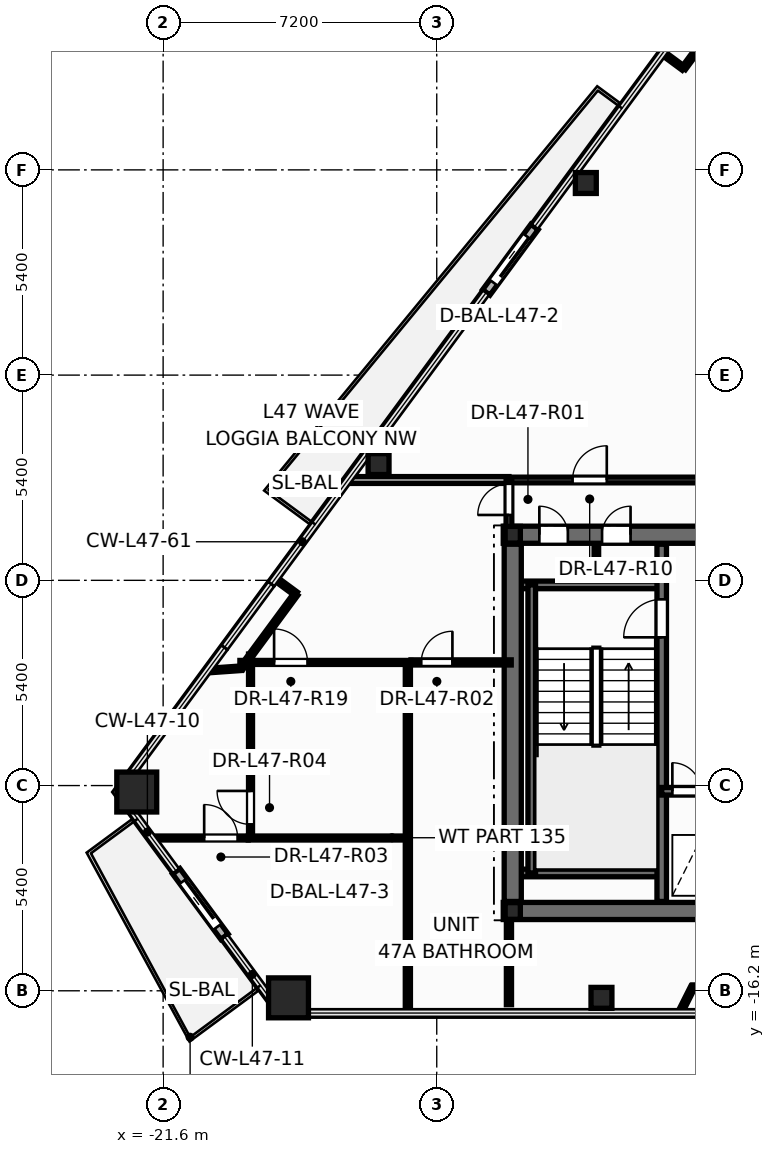
"""IFC4 building model, lengths in metres.
Left out: names, types, materials, properties, quantities, classifications, styles, units other than length and angle.
Written with IfcOpenShell. Run it as: python <this file> out.ifc"""

import sys

from ifc_helpers import new_model, si_unit, direction, frame, frame_2d, origin, origin_2d, place, context, subcontext, project, spatial, rectangle, hollow_rectangle, hollow_circle, i_section, extrude, element, fill, save


model = new_model("IFC4")
c1 = context("Model", 3, precision=1e-05, world=origin(), true_north=direction((0.0, 1.0)))
c2 = subcontext(c1, "Body", "Model", "MODEL_VIEW")
j1 = project(units=[si_unit("LENGTHUNIT", "METRE"), si_unit("PLANEANGLEUNIT", "RADIAN")], contexts=[c1])
p1 = place(None, origin())
s1 = spatial("IfcSite", under=j1, at=p1, CompositionType="ELEMENT")
p2 = place(p1, origin())
s2 = spatial("IfcBuilding", under=s1, at=p2, CompositionType="ELEMENT")
p3 = place(p2, frame((0.0, 0.0, 182.1)))
s3 = spatial("IfcBuildingStorey", under=s2, at=p3, CompositionType="ELEMENT", Elevation=182.1)
for number, where, z_axis, x_axis in (
    (1, (-22.294, -10.97, 0.0), (0.0, 0.0, 1.0), (1.0, 0.0, 0.0)),
    (2, (-18.301, -16.385, 0.0), (0.0, 0.0, 1.0), (1.0, 0.0, 0.0)),
):
    element("IfcColumn", number, at=place(p3, frame(where, z_axis=z_axis, x_axis=x_axis)), inside=s3, PredefinedType="COLUMN", context=c2, shape_type="SweptSolid", body=[
        extrude(hollow_rectangle(XDim=1.05, YDim=1.05, WallThickness=0.045, at=origin_2d()), origin(), (0.0, 0.0, 1.0), 3.6),
    ])
for number, where, z_axis, x_axis in (
    (3, (-10.065, -16.385, 0.0), (0.0, 0.0, 1.0), (1.0, 0.0, 0.0)),
    (4, (-10.477, 5.055, 0.0), (0.0, 0.0, 1.0), (1.0, 0.0, 0.0)),
    (5, (-15.931, -2.341, 0.0), (0.0, 0.0, 1.0), (1.0, 0.0, 0.0)),
):
    element("IfcColumn", number, at=place(p3, frame(where, z_axis=z_axis, x_axis=x_axis)), inside=s3, PredefinedType="COLUMN", context=c2, shape_type="SweptSolid", body=[
        extrude(hollow_circle(Radius=0.275, WallThickness=0.024, at=origin_2d()), origin(), (0.0, 0.0, 1.0), 3.6),
    ])
for number, where, z_axis, x_axis in (
    (6, (-12.4, -14.1, 0.0), (0.0, 0.0, 1.0), (1.0, 0.0, 0.0)),
    (7, (-12.4, -4.2, 0.0), (0.0, 0.0, 1.0), (1.0, 0.0, 0.0)),
):
    element("IfcColumn", number, at=place(p3, frame(where, z_axis=z_axis, x_axis=x_axis)), inside=s3, PredefinedType="COLUMN", context=c2, shape_type="SweptSolid", body=[
        extrude(i_section(OverallWidth=0.4, OverallDepth=0.44, WebThickness=0.028, FlangeThickness=0.04, at=origin_2d()), origin(), (0.0, 0.0, 1.0), 3.6),
    ])
p4 = place(p3, frame((-11.826, 3.899, -0.015), z_axis=(0.0, 0.0, 1.0), x_axis=(-0.593537527179, -0.804806314482, 0.0)))
e8 = element("IfcWall", 8, at=p4, inside=s3, PredefinedType="STANDARD", context=c2, shape_type="SweptSolid", body=[
    extrude(rectangle(XDim=2.14, YDim=0.24, at=frame_2d((1.07, 0.0))), origin(), (0.0, 0.0, 1.0), 2.807),
])
p5 = place(p4, frame((0.32, 0.0, 0.015)))
e9 = element("IfcOpeningElement", 9, at=p5, cuts=e8, PredefinedType="OPENING", context=c2, shape_type="SweptSolid", body=[
    extrude(rectangle(XDim=1.506, YDim=2.204, at=frame_2d((0.75, 1.102))), frame((0.0, 0.13, 0.0), z_axis=(0.0, -1.0, 0.0), x_axis=(1.0, 0.0, 0.0)), (0.0, 0.0, 1.0), 0.26),
])
p6 = place(p3, frame((-21.255, -13.053, -0.015), z_axis=(0.0, 0.0, 1.0), x_axis=(0.593463631131, -0.804860806926, 0.0)))
e10 = element("IfcWall", 10, at=p6, inside=s3, PredefinedType="STANDARD", context=c2, shape_type="SweptSolid", body=[
    extrude(rectangle(XDim=2.14, YDim=0.24, at=frame_2d((1.07, 0.0))), origin(), (0.0, 0.0, 1.0), 2.807),
])
p7 = place(p6, frame((0.32, 0.0, 0.015)))
e11 = element("IfcOpeningElement", 11, at=p7, cuts=e10, PredefinedType="OPENING", context=c2, shape_type="SweptSolid", body=[
    extrude(rectangle(XDim=1.506, YDim=2.204, at=frame_2d((0.75, 1.102))), frame((0.0, 0.13, 0.0), z_axis=(0.0, -1.0, 0.0), x_axis=(1.0, 0.0, 0.0)), (0.0, 0.0, 1.0), 0.26),
])
p8 = place(p3, frame((-10.2, -5.52, 0.0), z_axis=(0.0, 0.0, 1.0), x_axis=(0.0, 1.0, 0.0)))
e12 = element("IfcWall", 12, at=p8, inside=s3, PredefinedType="PARTITIONING", context=c2, shape_type="SweptSolid", body=[
    extrude(rectangle(XDim=1.12, YDim=0.12, at=frame_2d((0.56, 0.0))), origin(), (0.0, 0.0, 1.0), 3.35),
])
p9 = place(p3, frame((-12.65, -14.1, 0.0), z_axis=(0.0, 0.0, 1.0), x_axis=(1.0, 0.0, 0.0)))
e13 = element("IfcWall", 13, at=p9, inside=s3, PredefinedType="SHEAR", context=c2, shape_type="SweptSolid", body=[
    extrude(rectangle(XDim=25.3, YDim=0.45, at=frame_2d((12.65, 0.0))), origin(), (0.0, 0.0, 1.0), 3.6),
])
p10 = place(p3, frame((-12.65, -4.2, 0.0), z_axis=(0.0, 0.0, 1.0), x_axis=(1.0, 0.0, 0.0)))
e14 = element("IfcWall", 14, at=p10, inside=s3, PredefinedType="SHEAR", context=c2, shape_type="SweptSolid", body=[
    extrude(rectangle(XDim=25.3, YDim=0.45, at=frame_2d((12.65, 0.0))), origin(), (0.0, 0.0, 1.0), 3.6),
])
p11 = place(p10, frame((0.95, 0.0, 0.0)))
e15 = element("IfcOpeningElement", 15, at=p11, cuts=e14, PredefinedType="OPENING", context=c2, shape_type="SweptSolid", body=[
    extrude(rectangle(XDim=0.756, YDim=2.054, at=frame_2d((0.375, 1.027))), frame((0.0, 0.235, 0.0), z_axis=(0.0, -1.0, 0.0), x_axis=(1.0, 0.0, 0.0)), (0.0, 0.0, 1.0), 0.47),
])
p12 = place(p10, frame((2.6, 0.0, 0.0)))
e16 = element("IfcOpeningElement", 16, at=p12, cuts=e14, PredefinedType="OPENING", context=c2, shape_type="SweptSolid", body=[
    extrude(rectangle(XDim=0.756, YDim=2.054, at=frame_2d((0.375, 1.027))), frame((0.0, 0.235, 0.0), z_axis=(0.0, -1.0, 0.0), x_axis=(1.0, 0.0, 0.0)), (0.0, 0.0, 1.0), 0.47),
])
p13 = place(p10, frame((21.85, 0.0, 0.0)))
e17 = element("IfcOpeningElement", 17, at=p13, cuts=e14, PredefinedType="OPENING", context=c2, shape_type="SweptSolid", body=[
    extrude(rectangle(XDim=0.756, YDim=2.054, at=frame_2d((0.375, 1.027))), frame((0.0, 0.235, 0.0), z_axis=(0.0, -1.0, 0.0), x_axis=(1.0, 0.0, 0.0)), (0.0, 0.0, 1.0), 0.47),
])
p14 = place(p10, frame((23.5, 0.0, 0.0)))
e18 = element("IfcOpeningElement", 18, at=p14, cuts=e14, PredefinedType="OPENING", context=c2, shape_type="SweptSolid", body=[
    extrude(rectangle(XDim=0.756, YDim=2.054, at=frame_2d((0.375, 1.027))), frame((0.0, 0.235, 0.0), z_axis=(0.0, -1.0, 0.0), x_axis=(1.0, 0.0, 0.0)), (0.0, 0.0, 1.0), 0.47),
])
p15 = place(p10, frame((5.85, 0.0, 0.0)))
e19 = element("IfcOpeningElement", 19, at=p15, cuts=e14, PredefinedType="OPENING", context=c2, shape_type="SweptSolid", body=[
    extrude(rectangle(XDim=1.006, YDim=2.104, at=frame_2d((0.5, 1.052))), frame((0.0, 0.235, 0.0), z_axis=(0.0, -1.0, 0.0), x_axis=(1.0, 0.0, 0.0)), (0.0, 0.0, 1.0), 0.47),
])
p16 = place(p10, frame((10.35, 0.0, 0.0)))
e20 = element("IfcOpeningElement", 20, at=p16, cuts=e14, PredefinedType="OPENING", context=c2, shape_type="SweptSolid", body=[
    extrude(rectangle(XDim=1.406, YDim=2.154, at=frame_2d((0.7, 1.077))), frame((0.0, 0.235, 0.0), z_axis=(0.0, -1.0, 0.0), x_axis=(1.0, 0.0, 0.0)), (0.0, 0.0, 1.0), 0.47),
])
p17 = place(p10, frame((18.45, 0.0, 0.0)))
e21 = element("IfcOpeningElement", 21, at=p17, cuts=e14, PredefinedType="OPENING", context=c2, shape_type="SweptSolid", body=[
    extrude(rectangle(XDim=1.006, YDim=2.104, at=frame_2d((0.5, 1.052))), frame((0.0, 0.235, 0.0), z_axis=(0.0, -1.0, 0.0), x_axis=(1.0, 0.0, 0.0)), (0.0, 0.0, 1.0), 0.47),
])
for number, where, z_axis, x_axis in (
    (22, (-12.35, -5.52, 0.0), (0.0, 0.0, 1.0), (1.0, 0.0, 0.0)),
    (23, (-12.35, -13.1, 0.0), (0.0, 0.0, 1.0), (1.0, 0.0, 0.0)),
):
    element("IfcWall", number, at=place(p3, frame(where, z_axis=z_axis, x_axis=x_axis)), inside=s3, PredefinedType="SOLIDWALL", context=c2, shape_type="SweptSolid", body=[
        extrude(rectangle(XDim=3.87, YDim=0.2, at=frame_2d((1.935, 0.0))), origin(), (0.0, 0.0, 1.0), 3.6),
    ])
p18 = place(p3, frame((-11.9, -13.1, 0.0), z_axis=(0.0, 0.0, 1.0), x_axis=(0.0, 1.0, 0.0)))
e24 = element("IfcWall", 24, at=p18, inside=s3, PredefinedType="SOLIDWALL", context=c2, shape_type="SweptSolid", body=[
    extrude(rectangle(XDim=7.58, YDim=0.2, at=frame_2d((3.79, 0.0))), origin(), (0.0, 0.0, 1.0), 3.6),
])
p19 = place(p3, frame((-8.48, -13.85, 0.0), z_axis=(0.0, 0.0, 1.0), x_axis=(0.0, 1.0, 0.0)))
e25 = element("IfcWall", 25, at=p19, inside=s3, PredefinedType="SHEAR", context=c2, shape_type="SweptSolid", body=[
    extrude(rectangle(XDim=9.4, YDim=0.25, at=frame_2d((4.7, 0.0))), origin(), (0.0, 0.0, 1.0), 3.6),
])
p20 = place(p19, frame((6.95, 0.0, 0.0)))
e26 = element("IfcOpeningElement", 26, at=p20, cuts=e25, PredefinedType="OPENING", context=c2, shape_type="SweptSolid", body=[
    extrude(rectangle(XDim=1.006, YDim=2.104, at=frame_2d((0.5, 1.052))), frame((0.0, 0.135, 0.0), z_axis=(0.0, -1.0, 0.0), x_axis=(1.0, 0.0, 0.0)), (0.0, 0.0, 1.0), 0.27),
])
p21 = place(p3, frame((-8.48, -10.95, 0.0), z_axis=(0.0, 0.0, 1.0), x_axis=(1.0, 0.0, 0.0)))
e27 = element("IfcWall", 27, at=p21, inside=s3, PredefinedType="SOLIDWALL", context=c2, shape_type="SweptSolid", body=[
    extrude(rectangle(XDim=3.36, YDim=0.2, at=frame_2d((1.68, 0.0))), origin(), (0.0, 0.0, 1.0), 3.6),
])
p22 = place(p21, frame((0.28, 0.0, 0.0)))
e28 = element("IfcOpeningElement", 28, at=p22, cuts=e27, PredefinedType="OPENING", context=c2, shape_type="SweptSolid", body=[
    extrude(rectangle(XDim=0.756, YDim=2.054, at=frame_2d((0.375, 1.027))), frame((0.0, 0.11, 0.0), z_axis=(0.0, -1.0, 0.0), x_axis=(1.0, 0.0, 0.0)), (0.0, 0.0, 1.0), 0.22),
])
p23 = place(p21, frame((1.85, 0.0, 0.0)))
e29 = element("IfcOpeningElement", 29, at=p23, cuts=e27, PredefinedType="OPENING", context=c2, shape_type="SweptSolid", body=[
    extrude(rectangle(XDim=1.106, YDim=2.104, at=frame_2d((0.55, 1.052))), frame((0.0, 0.11, 0.0), z_axis=(0.0, -1.0, 0.0), x_axis=(1.0, 0.0, 0.0)), (0.0, 0.0, 1.0), 0.22),
])
p24 = place(p3, frame((-12.4, -13.85, 0.0), z_axis=(0.0, 0.0, 1.0), x_axis=(0.0, 1.0, 0.0)))
e30 = element("IfcWall", 30, at=p24, inside=s3, PredefinedType="SHEAR", context=c2, shape_type="SweptSolid", body=[
    extrude(rectangle(XDim=9.4, YDim=0.45, at=frame_2d((4.7, 0.0))), origin(), (0.0, 0.0, 1.0), 3.6),
])
p25 = place(p3, frame((-12.5, -2.76, 0.0), z_axis=(0.0, 0.0, 1.0), x_axis=(1.0, 0.0, 0.0)))
e31 = element("IfcWall", 31, at=p25, inside=s3, PredefinedType="PARTITIONING", context=c2, shape_type="SweptSolid", body=[
    extrude(rectangle(XDim=6.76, YDim=0.15, at=frame_2d((3.38, 0.0))), origin(), (0.0, 0.0, 1.0), 2.325),
])
p26 = place(p25, frame((1.675, 0.0, 0.0)))
e32 = element("IfcOpeningElement", 32, at=p26, cuts=e31, PredefinedType="OPENING", context=c2, shape_type="SweptSolid", body=[
    extrude(rectangle(XDim=0.906, YDim=2.104, at=frame_2d((0.45, 1.052))), frame((0.0, 0.085, 0.0), z_axis=(0.0, -1.0, 0.0), x_axis=(1.0, 0.0, 0.0)), (0.0, 0.0, 1.0), 0.17),
])
p27 = place(p3, frame((-19.3, -12.18, 0.0), z_axis=(0.0, 0.0, 1.0), x_axis=(0.0, 1.0, 0.0)))
e33 = element("IfcWall", 33, at=p27, inside=s3, PredefinedType="PARTITIONING", context=c2, shape_type="SweptSolid", body=[
    extrude(rectangle(XDim=4.84, YDim=0.105, at=frame_2d((2.42, 0.0))), origin(), (0.0, 0.0, 1.0), 2.325),
])
p28 = place(p27, frame((0.359, 0.0, 0.0)))
e34 = element("IfcOpeningElement", 34, at=p28, cuts=e33, PredefinedType="OPENING", context=c2, shape_type="SweptSolid", body=[
    extrude(rectangle(XDim=0.886, YDim=2.104, at=frame_2d((0.44, 1.052))), frame((0.0, 0.062, 0.0), z_axis=(0.0, -1.0, 0.0), x_axis=(1.0, 0.0, 0.0)), (0.0, 0.0, 1.0), 0.125),
])
p29 = place(p3, frame((-15.16, -16.786, 0.0), z_axis=(0.0, 0.0, 1.0), x_axis=(0.0, 1.0, 0.0)))
e35 = element("IfcWall", 35, at=p29, inside=s3, PredefinedType="PARTITIONING", context=c2, shape_type="SweptSolid", body=[
    extrude(rectangle(XDim=9.226, YDim=0.135, at=frame_2d((4.613, 0.0))), origin(), (0.0, 0.0, 1.0), 2.24),
])
p30 = place(p3, frame((-19.58, -7.56, 0.0), z_axis=(0.0, 0.0, 1.0), x_axis=(1.0, 0.0, 0.0)))
e36 = element("IfcWall", 36, at=p30, inside=s3, PredefinedType="PARTITIONING", context=c2, shape_type="SweptSolid", body=[
    extrude(rectangle(XDim=4.5, YDim=0.105, at=frame_2d((2.25, 0.0))), origin(), (0.0, 0.0, 1.0), 2.325),
])
p31 = place(p30, frame((0.9, 0.0, 0.0)))
e37 = element("IfcOpeningElement", 37, at=p31, cuts=e36, PredefinedType="OPENING", context=c2, shape_type="SweptSolid", body=[
    extrude(rectangle(XDim=0.886, YDim=2.104, at=frame_2d((0.44, 1.052))), frame((0.0, 0.062, 0.0), z_axis=(0.0, -1.0, 0.0), x_axis=(1.0, 0.0, 0.0)), (0.0, 0.0, 1.0), 0.125),
])
p32 = place(p3, frame((-7.663, -16.106, 0.0), z_axis=(0.0, 0.0, 1.0), x_axis=(1.0, 0.0, 0.0)))
e38 = element("IfcWall", 38, at=p32, inside=s3, PredefinedType="PARTITIONING", context=c2, shape_type="SweptSolid", body=[
    extrude(rectangle(XDim=4.422, YDim=0.12, at=frame_2d((2.211, 0.0))), origin(), (0.0, 0.0, 1.0), 2.325),
])
p33 = place(p3, frame((-16.737, -2.76, 0.0), z_axis=(0.0, 0.0, 1.0), x_axis=(1.0, 0.0, 0.0)))
e39 = element("IfcWall", 39, at=p33, inside=s3, PredefinedType="PARTITIONING", context=c2, shape_type="SweptSolid", body=[
    extrude(rectangle(XDim=4.237, YDim=0.18, at=frame_2d((2.118, 0.0))), origin(), (0.0, 0.0, 1.0), 2.325),
])
p34 = place(p3, frame((-19.36, -12.18, 0.0), z_axis=(0.0, 0.0, 1.0), x_axis=(1.0, 0.0, 0.0)))
e40 = element("IfcWall", 40, at=p34, inside=s3, PredefinedType="PARTITIONING", context=c2, shape_type="SweptSolid", body=[
    extrude(rectangle(XDim=4.2, YDim=0.105, at=frame_2d((2.1, 0.0))), origin(), (0.0, 0.0, 1.0), 2.325),
])
p35 = place(p3, frame((-15.078, -7.56, 0.0), z_axis=(0.0, 0.0, 1.0), x_axis=(1.0, 0.0, 0.0)))
e41 = element("IfcWall", 41, at=p35, inside=s3, PredefinedType="PARTITIONING", context=c2, shape_type="SweptSolid", body=[
    extrude(rectangle(XDim=2.638, YDim=0.135, at=frame_2d((1.319, 0.0))), origin(), (0.0, 0.0, 1.0), 2.792),
])
p36 = place(p35, frame((0.271, 0.0, 0.0)))
e42 = element("IfcOpeningElement", 42, at=p36, cuts=e41, PredefinedType="OPENING", context=c2, shape_type="SweptSolid", body=[
    extrude(rectangle(XDim=0.826, YDim=2.104, at=frame_2d((0.41, 1.052))), frame((0.0, 0.078, 0.0), z_axis=(0.0, -1.0, 0.0), x_axis=(1.0, 0.0, 0.0)), (0.0, 0.0, 1.0), 0.155),
])
p37 = place(p3, frame((-21.899, -12.18, 0.0), z_axis=(0.0, 0.0, 1.0), x_axis=(1.0, 0.0, 0.0)))
e43 = element("IfcWall", 43, at=p37, inside=s3, PredefinedType="PARTITIONING", context=c2, shape_type="SweptSolid", body=[
    extrude(rectangle(XDim=2.537, YDim=0.105, at=frame_2d((1.269, 0.0))), origin(), (0.0, 0.0, 1.0), 2.325),
])
p38 = place(p37, frame((1.379, 0.0, 0.0)))
e44 = element("IfcOpeningElement", 44, at=p38, cuts=e43, PredefinedType="OPENING", context=c2, shape_type="SweptSolid", body=[
    extrude(rectangle(XDim=0.886, YDim=2.104, at=frame_2d((0.44, 1.052))), frame((0.0, 0.062, 0.0), z_axis=(0.0, -1.0, 0.0), x_axis=(1.0, 0.0, 0.0)), (0.0, 0.0, 1.0), 0.125),
])
for number, where, z_axis, x_axis in (
    (45, (-18.102, -5.757, 0.0), (0.0, 0.0, 1.0), (-0.594, -0.805, 0.0)),
    (46, (-6.463, 10.027, 0.0), (0.0, 0.0, 1.0), (-0.593, -0.805, 0.0)),
):
    element("IfcWall", number, at=place(p3, frame(where, z_axis=z_axis, x_axis=x_axis)), inside=s3, PredefinedType="PARTITIONING", context=c2, shape_type="SweptSolid", body=[
        extrude(rectangle(XDim=2.43, YDim=0.12, at=frame_2d((1.215, 0.0))), origin(), (0.0, 0.0, 1.0), 3.35),
    ])
p39 = place(p3, frame((-12.5, -4.24, 0.0), z_axis=(0.0, 0.0, 1.0), x_axis=(0.0, 1.0, 0.0)))
e47 = element("IfcWall", 47, at=p39, inside=s3, PredefinedType="PARTITIONING", context=c2, shape_type="SweptSolid", body=[
    extrude(rectangle(XDim=1.48, YDim=0.15, at=frame_2d((0.74, 0.0))), origin(), (0.0, 0.0, 1.0), 2.325),
])
p40 = place(p39, frame((0.56, 0.0, 0.0)))
e48 = element("IfcOpeningElement", 48, at=p40, cuts=e47, PredefinedType="OPENING", context=c2, shape_type="SweptSolid", body=[
    extrude(rectangle(XDim=0.826, YDim=2.104, at=frame_2d((0.41, 1.052))), frame((0.0, 0.085, 0.0), z_axis=(0.0, -1.0, 0.0), x_axis=(1.0, 0.0, 0.0)), (0.0, 0.0, 1.0), 0.17),
])
p41 = place(p3, frame((-19.544, -7.713, 0.0), z_axis=(0.0, 0.0, 1.0), x_axis=(-0.997514712132, -0.070458491903, 0.0)))
e49 = element("IfcWall", 49, at=p41, inside=s3, PredefinedType="PARTITIONING", context=c2, shape_type="SweptSolid", body=[
    extrude(rectangle(XDim=0.88, YDim=0.12, at=frame_2d((0.44, 0.0))), origin(), (0.0, 0.0, 1.0), 2.792),
])
p42 = place(p3, frame((-8.0, -16.776, 0.0), z_axis=(0.0, 0.0, 1.0), x_axis=(0.449555870508, 0.893252214826, 0.0)))
e50 = element("IfcWall", 50, at=p42, inside=s3, PredefinedType="PARTITIONING", context=c2, shape_type="SweptSolid", body=[
    extrude(rectangle(XDim=0.75, YDim=0.12, at=frame_2d((0.375, 0.0))), origin(), (0.0, 0.0, 1.0), 2.325),
])
p43 = place(p3, frame((-18.641, -5.36, 0.0), z_axis=(0.0, 0.0, 1.0), x_axis=(0.804826838501, -0.593509696659, 0.0)))
e51 = element("IfcWall", 51, at=p43, inside=s3, PredefinedType="PARTITIONING", context=c2, shape_type="SweptSolid", body=[
    extrude(rectangle(XDim=0.67, YDim=0.12, at=frame_2d((0.335, 0.0))), origin(), (0.0, 0.0, 1.0), 2.792),
])
p44 = place(p3, frame((-7.905, 8.071, 0.0), z_axis=(0.0, 0.0, 1.0), x_axis=(-0.804698441933, 0.59368376898, 0.0)))
e52 = element("IfcWall", 52, at=p44, inside=s3, PredefinedType="PARTITIONING", context=c2, shape_type="SweptSolid", body=[
    extrude(rectangle(XDim=0.67, YDim=0.12, at=frame_2d((0.335, 0.0))), origin(), (0.0, 0.0, 1.0), 2.792),
])
p45 = place(p3, frame((-12.5, -14.4, 0.0), z_axis=(0.0, 0.0, 1.0), x_axis=(0.0, -1.0, 0.0)))
e53 = element("IfcWall", 53, at=p45, inside=s3, PredefinedType="PARTITIONING", context=c2, shape_type="SweptSolid", body=[
    extrude(rectangle(XDim=2.166, YDim=0.135, at=frame_2d((1.083, 0.0))), origin(), (0.0, 0.0, 1.0), 2.24),
])
p46 = place(p5, origin())
e54 = element("IfcDoor", 54, at=p46, inside=s3, OperationType="SLIDING_TO_RIGHT", PredefinedType="DOOR", context=c2, shape_type="SweptSolid", body=[
    extrude(rectangle(XDim=1.5, YDim=2.2, at=frame_2d((0.75, 1.1))), frame((0.0, 0.025, 0.0), z_axis=(0.0, -1.0, 0.0), x_axis=(1.0, 0.0, 0.0)), (0.0, 0.0, 1.0), 0.05),
])
fill(e9, e54)
p47 = place(p7, origin())
e55 = element("IfcDoor", 55, at=p47, inside=s3, OperationType="SLIDING_TO_RIGHT", PredefinedType="DOOR", context=c2, shape_type="SweptSolid", body=[
    extrude(rectangle(XDim=1.5, YDim=2.2, at=frame_2d((0.75, 1.1))), frame((0.0, 0.025, 0.0), z_axis=(0.0, -1.0, 0.0), x_axis=(1.0, 0.0, 0.0)), (0.0, 0.0, 1.0), 0.05),
])
fill(e11, e55)
p48 = place(p20, origin())
e56 = element("IfcDoor", 56, at=p48, inside=s3, OperationType="SINGLE_SWING_LEFT", PredefinedType="DOOR", context=c2, shape_type="SweptSolid", body=[
    extrude(rectangle(XDim=1.0, YDim=2.1, at=frame_2d((0.5, 1.05))), frame((0.0, 0.025, 0.0), z_axis=(0.0, -1.0, 0.0), x_axis=(1.0, 0.0, 0.0)), (0.0, 0.0, 1.0), 0.05),
])
fill(e26, e56)
p49 = place(p22, origin())
e57 = element("IfcDoor", 57, at=p49, inside=s3, OperationType="SINGLE_SWING_LEFT", PredefinedType="DOOR", context=c2, shape_type="SweptSolid", body=[
    extrude(rectangle(XDim=0.75, YDim=2.05, at=frame_2d((0.375, 1.025))), frame((0.0, 0.025, 0.0), z_axis=(0.0, -1.0, 0.0), x_axis=(1.0, 0.0, 0.0)), (0.0, 0.0, 1.0), 0.05),
])
fill(e28, e57)
p50 = place(p11, origin())
e58 = element("IfcDoor", 58, at=p50, inside=s3, OperationType="SINGLE_SWING_LEFT", PredefinedType="DOOR", context=c2, shape_type="SweptSolid", body=[
    extrude(rectangle(XDim=0.75, YDim=2.05, at=frame_2d((0.375, 1.025))), frame((0.0, 0.025, 0.0), z_axis=(0.0, -1.0, 0.0), x_axis=(1.0, 0.0, 0.0)), (0.0, 0.0, 1.0), 0.05),
])
fill(e15, e58)
p51 = place(p12, origin())
e59 = element("IfcDoor", 59, at=p51, inside=s3, OperationType="SINGLE_SWING_RIGHT", PredefinedType="DOOR", context=c2, shape_type="SweptSolid", body=[
    extrude(rectangle(XDim=0.75, YDim=2.05, at=frame_2d((0.375, 1.025))), frame((0.0, 0.025, 0.0), z_axis=(0.0, -1.0, 0.0), x_axis=(1.0, 0.0, 0.0)), (0.0, 0.0, 1.0), 0.05),
])
fill(e16, e59)
p52 = place(p40, origin())
e60 = element("IfcDoor", 60, at=p52, inside=s3, OperationType="SINGLE_SWING_LEFT", PredefinedType="DOOR", context=c2, shape_type="SweptSolid", body=[
    extrude(rectangle(XDim=0.82, YDim=2.1, at=frame_2d((0.41, 1.05))), frame((0.0, 0.025, 0.0), z_axis=(0.0, -1.0, 0.0), x_axis=(1.0, 0.0, 0.0)), (0.0, 0.0, 1.0), 0.05),
])
fill(e48, e60)
p53 = place(p36, origin())
e61 = element("IfcDoor", 61, at=p53, inside=s3, OperationType="SINGLE_SWING_RIGHT", PredefinedType="DOOR", context=c2, shape_type="SweptSolid", body=[
    extrude(rectangle(XDim=0.82, YDim=2.1, at=frame_2d((0.41, 1.05))), frame((0.0, 0.025, 0.0), z_axis=(0.0, -1.0, 0.0), x_axis=(1.0, 0.0, 0.0)), (0.0, 0.0, 1.0), 0.05),
])
fill(e42, e61)
p54 = place(p38, origin())
e62 = element("IfcDoor", 62, at=p54, inside=s3, OperationType="SINGLE_SWING_LEFT", PredefinedType="DOOR", context=c2, shape_type="SweptSolid", body=[
    extrude(rectangle(XDim=0.88, YDim=2.1, at=frame_2d((0.44, 1.05))), frame((0.0, 0.025, 0.0), z_axis=(0.0, -1.0, 0.0), x_axis=(1.0, 0.0, 0.0)), (0.0, 0.0, 1.0), 0.05),
])
fill(e44, e62)
p55 = place(p28, origin())
e63 = element("IfcDoor", 63, at=p55, inside=s3, OperationType="SINGLE_SWING_RIGHT", PredefinedType="DOOR", context=c2, shape_type="SweptSolid", body=[
    extrude(rectangle(XDim=0.88, YDim=2.1, at=frame_2d((0.44, 1.05))), frame((0.0, 0.025, 0.0), z_axis=(0.0, -1.0, 0.0), x_axis=(1.0, 0.0, 0.0)), (0.0, 0.0, 1.0), 0.05),
])
fill(e34, e63)
p56 = place(p26, origin())
e64 = element("IfcDoor", 64, at=p56, inside=s3, OperationType="SINGLE_SWING_RIGHT", PredefinedType="DOOR", context=c2, shape_type="SweptSolid", body=[
    extrude(rectangle(XDim=0.9, YDim=2.1, at=frame_2d((0.45, 1.05))), frame((0.0, 0.025, 0.0), z_axis=(0.0, -1.0, 0.0), x_axis=(1.0, 0.0, 0.0)), (0.0, 0.0, 1.0), 0.05),
])
fill(e32, e64)
p57 = place(p31, origin())
e65 = element("IfcDoor", 65, at=p57, inside=s3, OperationType="SINGLE_SWING_LEFT", PredefinedType="DOOR", context=c2, shape_type="SweptSolid", body=[
    extrude(rectangle(XDim=0.88, YDim=2.1, at=frame_2d((0.44, 1.05))), frame((0.0, 0.025, 0.0), z_axis=(0.0, -1.0, 0.0), x_axis=(1.0, 0.0, 0.0)), (0.0, 0.0, 1.0), 0.05),
])
fill(e37, e65)
save(model, sys.argv[1])
